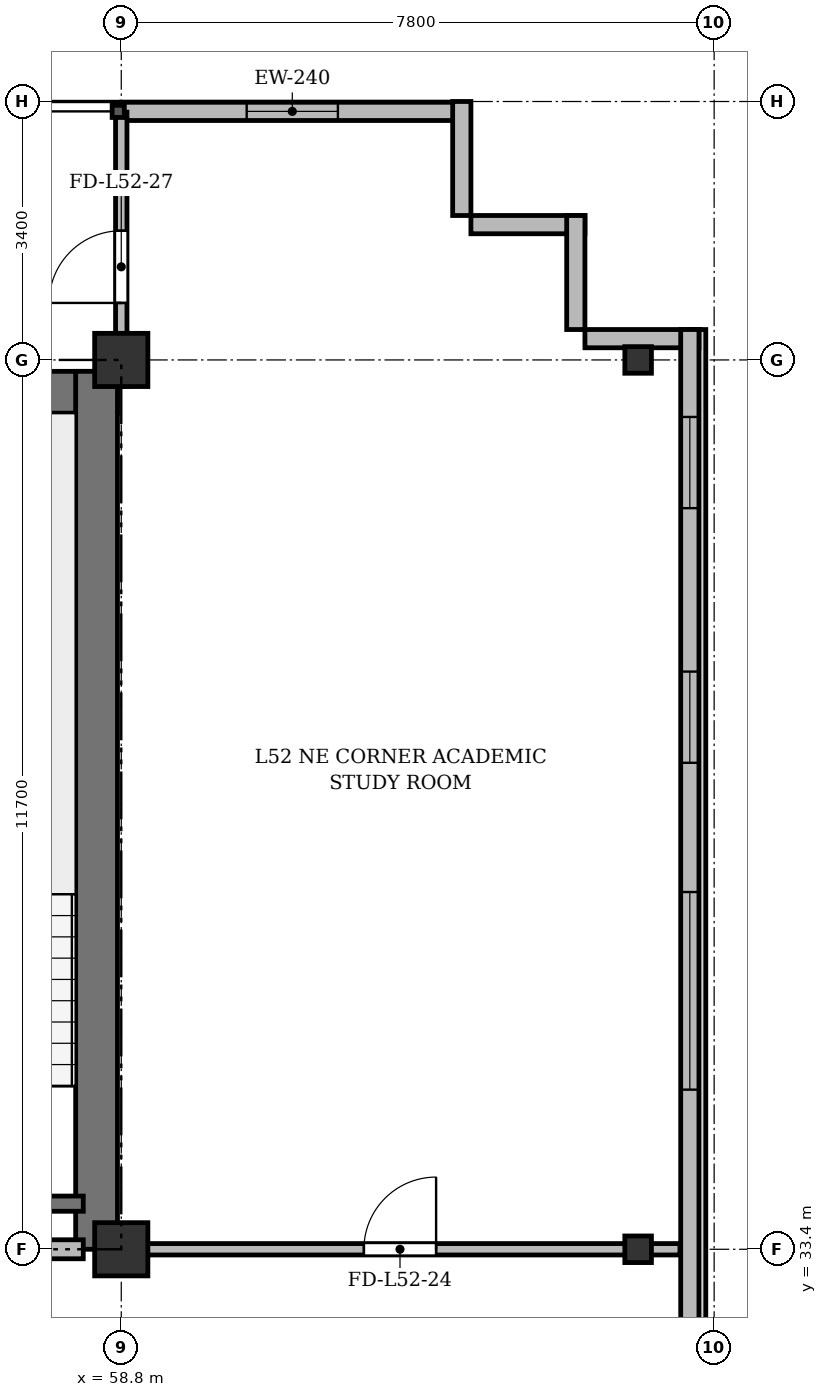
"""IFC4 building model, lengths in metres.
Left out: names, types, materials, properties, quantities, classifications, styles, units other than length and angle.
Written with IfcOpenShell. Run it as: python <this file> out.ifc"""

import sys

from ifc_helpers import new_model, si_unit, direction, frame, frame_2d, origin, origin_2d, place, context, subcontext, project, spatial, rectangle, i_section, extrude, source, transform, mapped, element, fill, save


model = new_model("IFC4")
c1 = context("Model", 3, precision=1e-05, world=origin(), true_north=direction((0.0, 1.0)))
c2 = subcontext(c1, "Body", "Model", "MODEL_VIEW")
j1 = project(units=[si_unit("LENGTHUNIT", "METRE"), si_unit("PLANEANGLEUNIT", "RADIAN")], contexts=[c1])
p1 = place(None, origin())
s1 = spatial("IfcSite", under=j1, at=p1, CompositionType="ELEMENT")
p2 = place(p1, origin())
s2 = spatial("IfcBuilding", under=s1, at=p2, CompositionType="ELEMENT")
p3 = place(p2, frame((0.0, 0.0, 201.3)))
s3 = spatial("IfcBuildingStorey", under=s2, at=p3, CompositionType="ELEMENT", Elevation=201.3)
m1 = source(origin(), c2, "Body", "SweptSolid", [
    extrude(rectangle(XDim=0.7, YDim=0.7, at=origin_2d()), origin(), (0.0, 0.0, 1.0), 3.6),
])
for number, where, z_axis, x_axis in (
    (1, (58.8, 33.4, 0.0), (0.0, 0.0, 1.0), (1.0, 0.0, 0.0)),
    (2, (58.8, 45.1, 0.0), (0.0, 0.0, 1.0), (1.0, 0.0, 0.0)),
):
    element("IfcColumn", number, at=place(p3, frame(where, z_axis=z_axis, x_axis=x_axis)), inside=s3, PredefinedType="COLUMN", context=c2, shape_type="MappedRepresentation", body=[
        mapped(m1, transform((0.0, 0.0, 0.0), x_axis=(1.0, 0.0, 0.0), y_axis=(0.0, 1.0, 0.0), z_axis=(0.0, 0.0, 1.0), scale=1.0)),
    ])
m2 = source(origin(), c2, "Body", "SweptSolid", [
    extrude(i_section(OverallWidth=0.35, OverallDepth=0.35, WebThickness=0.018, FlangeThickness=0.028, at=origin_2d()), origin(), (0.0, 0.0, 1.0), 3.6),
])
for number, where, z_axis, x_axis in (
    (3, (65.6, 33.4, 0.0), (0.0, 0.0, 1.0), (1.0, 0.0, 0.0)),
    (4, (65.6, 45.1, 0.0), (0.0, 0.0, 1.0), (1.0, 0.0, 0.0)),
):
    element("IfcColumn", number, at=place(p3, frame(where, z_axis=z_axis, x_axis=x_axis)), inside=s3, PredefinedType="COLUMN", context=c2, shape_type="MappedRepresentation", body=[
        mapped(m2, transform((0.0, 0.0, 0.0), x_axis=(1.0, 0.0, 0.0), y_axis=(0.0, 1.0, 0.0), z_axis=(0.0, 0.0, 1.0), scale=1.0)),
    ])
p4 = place(p3, frame((58.8, 48.37, 0.0), z_axis=(0.0, 0.0, 1.0), x_axis=(1.0, 0.0, 0.0)))
e5 = element("IfcWall", 5, at=p4, inside=s3, PredefinedType="SOLIDWALL", context=c2, shape_type="SweptSolid", body=[
    extrude(rectangle(XDim=4.5, YDim=0.24, at=frame_2d((2.25, 0.0))), origin(), (0.0, 0.0, 1.0), 3.22),
])
p5 = place(p4, frame((1.65, 0.0, 0.9)))
e6 = element("IfcOpeningElement", 6, at=p5, cuts=e5, PredefinedType="OPENING", context=c2, shape_type="SweptSolid", body=[
    extrude(rectangle(XDim=1.2, YDim=1.65, at=frame_2d((0.6, 0.825))), frame((0.0, 0.13, 0.0), z_axis=(0.0, -1.0, 0.0), x_axis=(1.0, 0.0, 0.0)), (0.0, 0.0, 1.0), 0.26),
])
for number, where, z_axis, x_axis in (
    (7, (63.28, 48.5, 0.0), (0.0, 0.0, 1.0), (0.0, -1.0, 0.0)),
    (8, (63.4, 46.88, 0.0), (0.0, 0.0, 1.0), (1.0, 0.0, 0.0)),
    (9, (64.78, 47.0, 0.0), (0.0, 0.0, 1.0), (0.0, -1.0, 0.0)),
    (10, (64.9, 45.38, 0.0), (0.0, 0.0, 1.0), (1.0, 0.0, 0.0)),
):
    element("IfcWall", number, at=place(p3, frame(where, z_axis=z_axis, x_axis=x_axis)), inside=s3, PredefinedType="SOLIDWALL", context=c2, shape_type="SweptSolid", body=[
        extrude(rectangle(XDim=1.5, YDim=0.24, at=frame_2d((0.75, 0.0))), origin(), (0.0, 0.0, 1.0), 3.22),
    ])
p6 = place(p3, frame((66.28, 45.5, 0.0), z_axis=(0.0, 0.0, 1.0), x_axis=(0.0, -1.0, 0.0)))
e11 = element("IfcWall", 11, at=p6, inside=s3, PredefinedType="SOLIDWALL", context=c2, shape_type="SweptSolid", body=[
    extrude(rectangle(XDim=39.1, YDim=0.24, at=frame_2d((19.55, 0.0))), origin(), (0.0, 0.0, 1.0), 3.22),
])
p7 = place(p6, frame((36.45, 0.0, 0.92)))
e12 = element("IfcOpeningElement", 12, at=p7, cuts=e11, PredefinedType="OPENING", context=c2, shape_type="SweptSolid", body=[
    extrude(rectangle(XDim=1.2, YDim=1.65, at=frame_2d((0.6, 0.825))), frame((0.0, 0.13, 0.0), z_axis=(0.0, -1.0, 0.0), x_axis=(1.0, 0.0, 0.0)), (0.0, 0.0, 1.0), 0.26),
])
p8 = place(p6, frame((32.8, 0.0, 0.92)))
e13 = element("IfcOpeningElement", 13, at=p8, cuts=e11, PredefinedType="OPENING", context=c2, shape_type="SweptSolid", body=[
    extrude(rectangle(XDim=2.6, YDim=1.9, at=frame_2d((1.3, 0.95))), frame((0.0, 0.13, 0.0), z_axis=(0.0, -1.0, 0.0), x_axis=(1.0, 0.0, 0.0)), (0.0, 0.0, 1.0), 0.26),
])
p9 = place(p6, frame((28.6, 0.0, 0.92)))
e14 = element("IfcOpeningElement", 14, at=p9, cuts=e11, PredefinedType="OPENING", context=c2, shape_type="SweptSolid", body=[
    extrude(rectangle(XDim=2.6, YDim=1.9, at=frame_2d((1.3, 0.95))), frame((0.0, 0.13, 0.0), z_axis=(0.0, -1.0, 0.0), x_axis=(1.0, 0.0, 0.0)), (0.0, 0.0, 1.0), 0.26),
])
p10 = place(p6, frame((21.4, 0.0, 0.92)))
e15 = element("IfcOpeningElement", 15, at=p10, cuts=e11, PredefinedType="OPENING", context=c2, shape_type="SweptSolid", body=[
    extrude(rectangle(XDim=2.6, YDim=1.9, at=frame_2d((1.3, 0.95))), frame((0.0, 0.13, 0.0), z_axis=(0.0, -1.0, 0.0), x_axis=(1.0, 0.0, 0.0)), (0.0, 0.0, 1.0), 0.26),
])
p11 = place(p6, frame((7.4, 0.0, 0.92)))
e16 = element("IfcOpeningElement", 16, at=p11, cuts=e11, PredefinedType="OPENING", context=c2, shape_type="SweptSolid", body=[
    extrude(rectangle(XDim=2.6, YDim=1.9, at=frame_2d((1.3, 0.95))), frame((0.0, 0.13, 0.0), z_axis=(0.0, -1.0, 0.0), x_axis=(1.0, 0.0, 0.0)), (0.0, 0.0, 1.0), 0.26),
])
p12 = place(p6, frame((4.5, 0.0, 0.92)))
e17 = element("IfcOpeningElement", 17, at=p12, cuts=e11, PredefinedType="OPENING", context=c2, shape_type="SweptSolid", body=[
    extrude(rectangle(XDim=1.2, YDim=1.65, at=frame_2d((0.6, 0.825))), frame((0.0, 0.13, 0.0), z_axis=(0.0, -1.0, 0.0), x_axis=(1.0, 0.0, 0.0)), (0.0, 0.0, 1.0), 0.26),
])
p13 = place(p6, frame((1.15, 0.0, 0.92)))
e18 = element("IfcOpeningElement", 18, at=p13, cuts=e11, PredefinedType="OPENING", context=c2, shape_type="SweptSolid", body=[
    extrude(rectangle(XDim=1.2, YDim=1.65, at=frame_2d((0.6, 0.825))), frame((0.0, 0.13, 0.0), z_axis=(0.0, -1.0, 0.0), x_axis=(1.0, 0.0, 0.0)), (0.0, 0.0, 1.0), 0.26),
])
p14 = place(p3, frame((15.65, 44.675, 0.0), z_axis=(0.0, 0.0, 1.0), x_axis=(1.0, 0.0, 0.0)))
e19 = element("IfcWall", 19, at=p14, inside=s3, PredefinedType="SHEAR", context=c2, shape_type="SweptSolid", body=[
    extrude(rectangle(XDim=43.1, YDim=0.55, at=frame_2d((21.55, 0.0))), origin(), (0.0, 0.0, 1.0), 3.22),
])
p15 = place(p3, frame((58.475, 33.4, 0.0), z_axis=(0.0, 0.0, 1.0), x_axis=(0.0, 1.0, 0.0)))
e20 = element("IfcWall", 20, at=p15, inside=s3, PredefinedType="SHEAR", context=c2, shape_type="SweptSolid", body=[
    extrude(rectangle(XDim=11.55, YDim=0.55, at=frame_2d((5.775, 0.0))), origin(), (0.0, 0.0, 1.0), 3.22),
])
p16 = place(p3, frame((54.9, 34.0, 0.0), z_axis=(0.0, 0.0, 1.0), x_axis=(1.0, 0.0, 0.0)))
e21 = element("IfcWall", 21, at=p16, inside=s3, PredefinedType="SHEAR", context=c2, shape_type="SweptSolid", body=[
    extrude(rectangle(XDim=3.4, YDim=0.2, at=frame_2d((1.7, 0.0))), origin(), (0.0, 0.0, 1.0), 3.22),
])
p17 = place(p3, frame((47.15, 33.4, 0.0), z_axis=(0.0, 0.0, 1.0), x_axis=(1.0, 0.0, 0.0)))
e22 = element("IfcWall", 22, at=p17, inside=s3, PredefinedType="PARTITIONING", context=c2, shape_type="SweptSolid", body=[
    extrude(rectangle(XDim=11.15, YDim=0.25, at=frame_2d((5.575, 0.0))), origin(), (0.0, 0.0, 1.0), 2.77),
])
p18 = place(p17, frame((0.7, 0.0, 0.0)))
e23 = element("IfcOpeningElement", 23, at=p18, cuts=e22, PredefinedType="OPENING", context=c2, shape_type="SweptSolid", body=[
    extrude(rectangle(XDim=0.95, YDim=2.15, at=frame_2d((0.475, 1.075))), frame((0.0, 0.135, 0.0), z_axis=(0.0, -1.0, 0.0), x_axis=(1.0, 0.0, 0.0)), (0.0, 0.0, 1.0), 0.27),
])
p19 = place(p17, frame((6.0, 0.0, 0.0)))
e24 = element("IfcOpeningElement", 24, at=p19, cuts=e22, PredefinedType="OPENING", context=c2, shape_type="SweptSolid", body=[
    extrude(rectangle(XDim=1.2, YDim=2.15, at=frame_2d((0.6, 1.075))), frame((0.0, 0.135, 0.0), z_axis=(0.0, -1.0, 0.0), x_axis=(1.0, 0.0, 0.0)), (0.0, 0.0, 1.0), 0.27),
])
p20 = place(p3, frame((58.8, 33.4, 0.0), z_axis=(0.0, 0.0, 1.0), x_axis=(1.0, 0.0, 0.0)))
e25 = element("IfcWall", 25, at=p20, inside=s3, PredefinedType="PARTITIONING", context=c2, shape_type="SweptSolid", body=[
    extrude(rectangle(XDim=7.35, YDim=0.15, at=frame_2d((3.675, 0.0))), origin(), (0.0, 0.0, 1.0), 2.77),
])
p21 = place(p20, frame((3.192, 0.0, 0.0)))
e26 = element("IfcOpeningElement", 26, at=p21, cuts=e25, PredefinedType="OPENING", context=c2, shape_type="SweptSolid", body=[
    extrude(rectangle(XDim=0.95, YDim=2.15, at=frame_2d((0.475, 1.075))), frame((0.0, 0.085, 0.0), z_axis=(0.0, -1.0, 0.0), x_axis=(1.0, 0.0, 0.0)), (0.0, 0.0, 1.0), 0.17),
])
p22 = place(p3, frame((58.8, 44.75, 0.0), z_axis=(0.0, 0.0, 1.0), x_axis=(0.0, 1.0, 0.0)))
e27 = element("IfcWall", 27, at=p22, inside=s3, PredefinedType="PARTITIONING", context=c2, shape_type="SweptSolid", body=[
    extrude(rectangle(XDim=3.61, YDim=0.15, at=frame_2d((1.805, 0.0))), origin(), (0.0, 0.0, 1.0), 2.72),
])
p23 = place(p22, frame((1.1, 0.0, 0.0)))
e28 = element("IfcOpeningElement", 28, at=p23, cuts=e27, PredefinedType="OPENING", context=c2, shape_type="SweptSolid", body=[
    extrude(rectangle(XDim=0.95, YDim=2.15, at=frame_2d((0.475, 1.075))), frame((0.0, 0.085, 0.0), z_axis=(0.0, -1.0, 0.0), x_axis=(1.0, 0.0, 0.0)), (0.0, 0.0, 1.0), 0.17),
])
m3 = source(origin(), c2, "Body", "SweptSolid", [
    extrude(rectangle(XDim=1.2, YDim=1.65, at=frame_2d((0.6, 0.825))), frame((0.0, 0.03, 0.0), z_axis=(0.0, -1.0, 0.0), x_axis=(1.0, 0.0, 0.0)), (0.0, 0.0, 1.0), 0.06),
])
p24 = place(p5, origin())
e29 = element("IfcWindow", 29, at=p24, inside=s3, PartitioningType="SINGLE_PANEL", PredefinedType="WINDOW", context=c2, shape_type="MappedRepresentation", body=[
    mapped(m3, transform((0.0, 0.0, 0.0), x_axis=(1.0, 0.0, 0.0), y_axis=(0.0, 1.0, 0.0), z_axis=(0.0, 0.0, 1.0), scale=1.0)),
])
fill(e6, e29)
m4 = source(origin(), c2, "Body", "SweptSolid", [
    extrude(rectangle(XDim=2.6, YDim=1.9, at=frame_2d((1.3, 0.95))), frame((0.0, 0.03, 0.0), z_axis=(0.0, -1.0, 0.0), x_axis=(1.0, 0.0, 0.0)), (0.0, 0.0, 1.0), 0.06),
])
p25 = place(p11, origin())
e30 = element("IfcWindow", 30, at=p25, inside=s3, PartitioningType="SINGLE_PANEL", PredefinedType="WINDOW", context=c2, shape_type="MappedRepresentation", body=[
    mapped(m4, transform((0.0, 0.0, 0.0), x_axis=(1.0, 0.0, 0.0), y_axis=(0.0, 1.0, 0.0), z_axis=(0.0, 0.0, 1.0), scale=1.0)),
])
fill(e16, e30)
p26 = place(p12, origin())
e31 = element("IfcWindow", 31, at=p26, inside=s3, PartitioningType="SINGLE_PANEL", PredefinedType="WINDOW", context=c2, shape_type="MappedRepresentation", body=[
    mapped(m3, transform((0.0, 0.0, 0.0), x_axis=(1.0, 0.0, 0.0), y_axis=(0.0, 1.0, 0.0), z_axis=(0.0, 0.0, 1.0), scale=1.0)),
])
fill(e17, e31)
p27 = place(p13, origin())
e32 = element("IfcWindow", 32, at=p27, inside=s3, PartitioningType="SINGLE_PANEL", PredefinedType="WINDOW", context=c2, shape_type="MappedRepresentation", body=[
    mapped(m3, transform((0.0, 0.0, 0.0), x_axis=(1.0, 0.0, 0.0), y_axis=(0.0, 1.0, 0.0), z_axis=(0.0, 0.0, 1.0), scale=1.0)),
])
fill(e18, e32)
m5 = source(origin(), c2, "Body", "SweptSolid", [
    extrude(rectangle(XDim=0.95, YDim=2.15, at=frame_2d((0.475, 1.075))), frame((0.0, 0.025, 0.0), z_axis=(0.0, -1.0, 0.0), x_axis=(1.0, 0.0, 0.0)), (0.0, 0.0, 1.0), 0.05),
])
p28 = place(p21, origin())
e33 = element("IfcDoor", 33, at=p28, inside=s3, OperationType="SINGLE_SWING_RIGHT", PredefinedType="DOOR", context=c2, shape_type="MappedRepresentation", body=[
    mapped(m5, transform((0.0, 0.0, 0.0), x_axis=(1.0, 0.0, 0.0), y_axis=(0.0, 1.0, 0.0), z_axis=(0.0, 0.0, 1.0), scale=1.0)),
])
fill(e26, e33)
p29 = place(p23, origin())
e34 = element("IfcDoor", 34, at=p29, inside=s3, OperationType="SINGLE_SWING_LEFT", PredefinedType="DOOR", context=c2, shape_type="MappedRepresentation", body=[
    mapped(m5, transform((0.0, 0.0, 0.0), x_axis=(1.0, 0.0, 0.0), y_axis=(0.0, 1.0, 0.0), z_axis=(0.0, 0.0, 1.0), scale=1.0)),
])
fill(e28, e34)
save(model, sys.argv[1])
